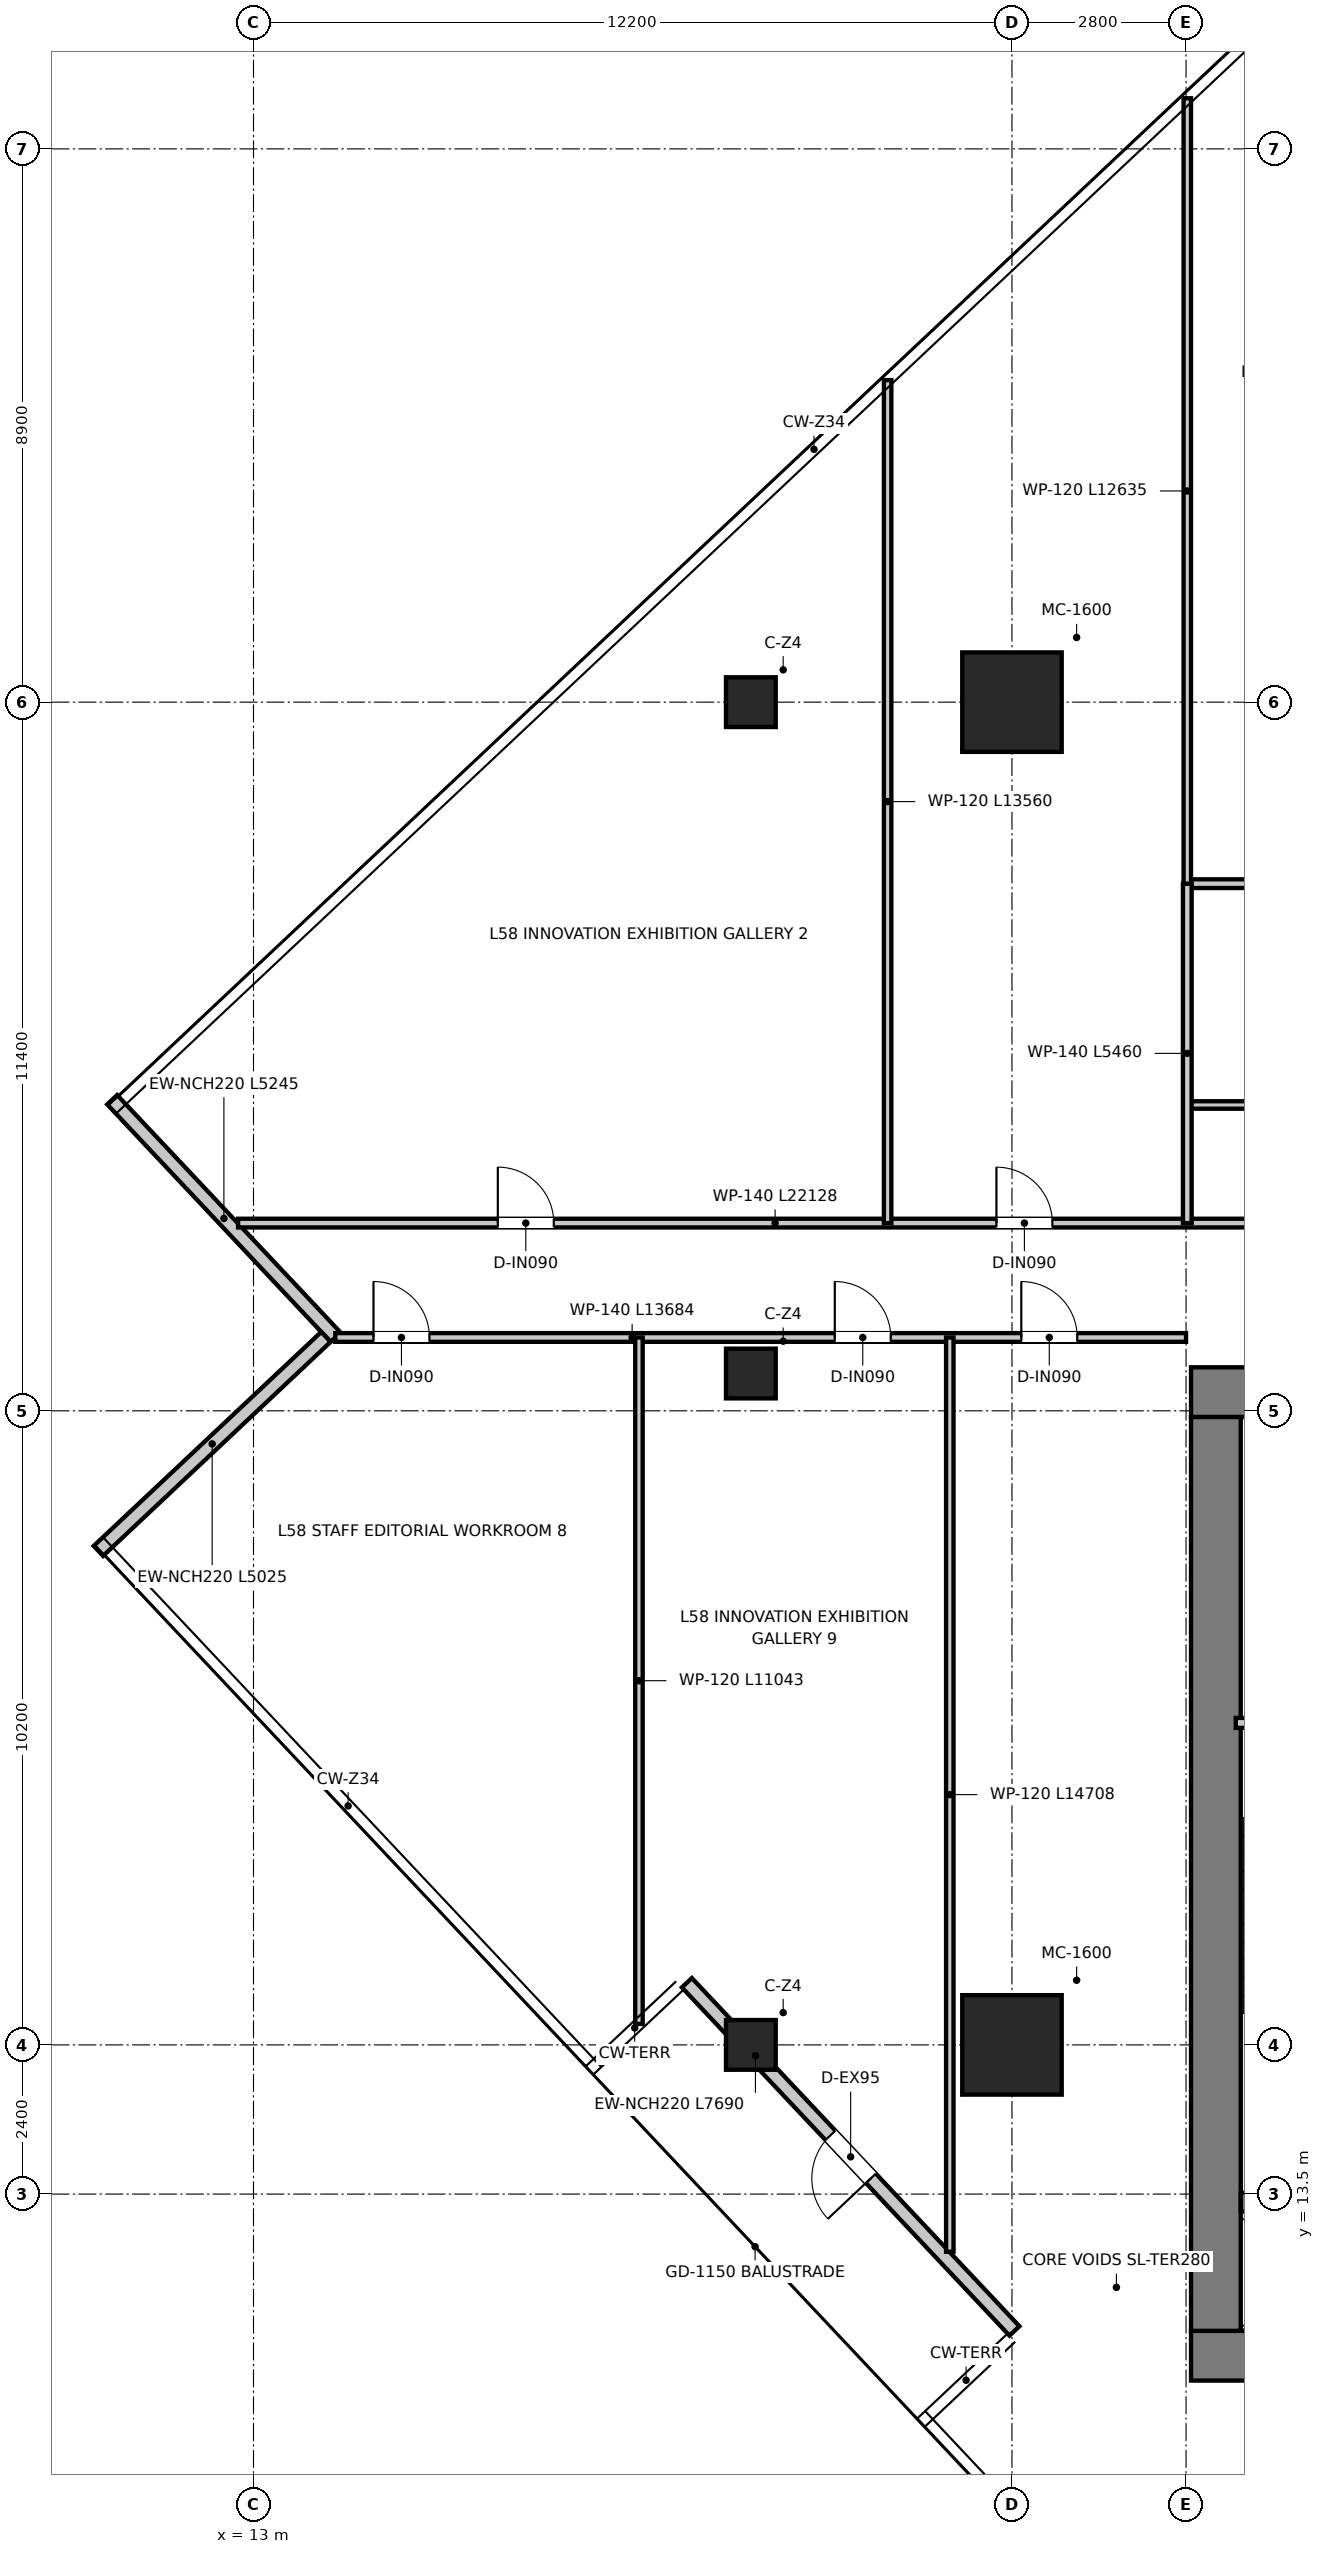
"""IFC4 building model, lengths in metres.
Left out: names, types, materials, properties, quantities, classifications, styles, units other than length and angle.
Written with IfcOpenShell. Run it as: python <this file> out.ifc"""

import sys

from ifc_helpers import new_model, si_unit, direction, frame, frame_2d, origin, origin_2d, place, context, subcontext, project, spatial, rectangle, extrude, source, transform, mapped, element, fill, save


model = new_model("IFC4")
c1 = context("Model", 3, precision=1e-05, world=origin(), true_north=direction((0.0, 1.0)))
c2 = subcontext(c1, "Body", "Model", "MODEL_VIEW")
j1 = project(units=[si_unit("LENGTHUNIT", "METRE"), si_unit("PLANEANGLEUNIT", "RADIAN")], contexts=[c1])
p1 = place(None, origin())
s1 = spatial("IfcSite", under=j1, at=p1, CompositionType="ELEMENT")
p2 = place(p1, origin())
s2 = spatial("IfcBuilding", under=s1, at=p2, CompositionType="ELEMENT")
p3 = place(p2, frame((0.0, 0.0, 238.9)))
s3 = spatial("IfcBuildingStorey", under=s2, at=p3, CompositionType="ELEMENT", Elevation=238.9)
p4 = place(p3, frame((28.08, 10.9, 0.0), z_axis=(0.0, 0.0, 1.0), x_axis=(1.0, 0.0, 0.0)))
e1 = element("IfcWall", 1, at=p4, inside=s3, PredefinedType="SHEAR", context=c2, shape_type="SweptSolid", body=[
    extrude(rectangle(XDim=15.84, YDim=0.8, at=frame_2d((7.92, 0.0))), origin(), (0.0, 0.0, 1.0), 3.95),
])
p5 = place(p3, frame((28.08, 26.4, 0.0), z_axis=(0.0, 0.0, 1.0), x_axis=(1.0, 0.0, 0.0)))
e2 = element("IfcWall", 2, at=p5, inside=s3, PredefinedType="SHEAR", context=c2, shape_type="SweptSolid", body=[
    extrude(rectangle(XDim=15.84, YDim=0.8, at=frame_2d((7.92, 0.0))), origin(), (0.0, 0.0, 1.0), 3.95),
])
p6 = place(p5, frame((7.22, 0.0, 0.0)))
e3 = element("IfcOpeningElement", 3, at=p6, cuts=e2, PredefinedType="OPENING", context=c2, shape_type="SweptSolid", body=[
    extrude(rectangle(XDim=1.4, YDim=2.2, at=frame_2d((0.7, 1.1))), frame((0.0, 0.41, 0.0), z_axis=(0.0, -1.0, 0.0), x_axis=(1.0, 0.0, 0.0)), (0.0, 0.0, 1.0), 0.82),
])
p7 = place(p5, frame((1.775, 0.0, 0.0)))
e4 = element("IfcOpeningElement", 4, at=p7, cuts=e2, PredefinedType="OPENING", context=c2, shape_type="SweptSolid", body=[
    extrude(rectangle(XDim=1.05, YDim=2.1, at=frame_2d((0.525, 1.05))), frame((0.0, 0.41, 0.0), z_axis=(0.0, -1.0, 0.0), x_axis=(1.0, 0.0, 0.0)), (0.0, 0.0, 1.0), 0.82),
])
p8 = place(p5, frame((13.015, 0.0, 0.0)))
e5 = element("IfcOpeningElement", 5, at=p8, cuts=e2, PredefinedType="OPENING", context=c2, shape_type="SweptSolid", body=[
    extrude(rectangle(XDim=1.05, YDim=2.1, at=frame_2d((0.525, 1.05))), frame((0.0, 0.41, 0.0), z_axis=(0.0, -1.0, 0.0), x_axis=(1.0, 0.0, 0.0)), (0.0, 0.0, 1.0), 0.82),
])
p9 = place(p3, frame((28.48, 11.3, 0.0), z_axis=(0.0, 0.0, 1.0), x_axis=(0.0, 1.0, 0.0)))
e6 = element("IfcWall", 6, at=p9, inside=s3, PredefinedType="SHEAR", context=c2, shape_type="SweptSolid", body=[
    extrude(rectangle(XDim=14.7, YDim=0.8, at=frame_2d((7.35, 0.0))), origin(), (0.0, 0.0, 1.0), 3.95),
])
p10 = place(p3, frame((28.88, 13.37, 0.0), z_axis=(0.0, 0.0, 1.0), x_axis=(1.0, 0.0, 0.0)))
e7 = element("IfcWall", 7, at=p10, inside=s3, PredefinedType="SHEAR", context=c2, shape_type="SweptSolid", body=[
    extrude(rectangle(XDim=3.1, YDim=0.3, at=frame_2d((1.55, 0.0))), origin(), (0.0, 0.0, 1.0), 3.95),
])
m1 = source(origin(), c2, "Body", "SweptSolid", [
    extrude(rectangle(XDim=1.6, YDim=1.6, at=origin_2d()), origin(), (0.0, 0.0, 1.0), 3.95),
])
for number, where, z_axis, x_axis in (
    (8, (25.2, 15.9, 0.0), (0.0, 0.0, 1.0), (1.0, 0.0, 0.0)),
    (9, (25.2, 37.5, 0.0), (0.0, 0.0, 1.0), (1.0, 0.0, 0.0)),
):
    element("IfcColumn", number, at=place(p3, frame(where, z_axis=z_axis, x_axis=x_axis)), inside=s3, PredefinedType="USERDEFINED", context=c2, shape_type="MappedRepresentation", body=[
        mapped(m1, transform((0.0, 0.0, 0.0), x_axis=(1.0, 0.0, 0.0), y_axis=(0.0, 1.0, 0.0), z_axis=(0.0, 0.0, 1.0), scale=1.0)),
    ])
m2 = source(origin(), c2, "Body", "SweptSolid", [
    extrude(rectangle(XDim=0.8, YDim=0.8, at=origin_2d()), origin(), (0.0, 0.0, 1.0), 3.95),
])
for number, where, z_axis, x_axis in (
    (10, (21.0, 15.9, 0.0), (0.0, 0.0, 1.0), (1.0, 0.0, 0.0)),
    (11, (21.0, 26.7, 0.0), (0.0, 0.0, 1.0), (1.0, 0.0, 0.0)),
    (12, (21.0, 37.5, 0.0), (0.0, 0.0, 1.0), (1.0, 0.0, 0.0)),
):
    element("IfcColumn", number, at=place(p3, frame(where, z_axis=z_axis, x_axis=x_axis)), inside=s3, PredefinedType="COLUMN", context=c2, shape_type="MappedRepresentation", body=[
        mapped(m2, transform((0.0, 0.0, 0.0), x_axis=(1.0, 0.0, 0.0), y_axis=(0.0, 1.0, 0.0), z_axis=(0.0, 0.0, 1.0), scale=1.0)),
    ])
p11 = place(p3, frame((10.727, 31.105, 0.0), z_axis=(0.0, 0.0, 1.0), x_axis=(0.685178828418, -0.728374884992, 0.0)))
e13 = element("IfcWall", 13, at=p11, inside=s3, PredefinedType="ELEMENTEDWALL", context=c2, shape_type="SweptSolid", body=[
    extrude(rectangle(XDim=5.245, YDim=0.22, at=frame_2d((2.623, 0.0))), origin(), (0.0, 0.0, 1.0), 3.67),
])
p12 = place(p3, frame((14.165, 27.289, 0.0), z_axis=(0.0, 0.0, 1.0), x_axis=(-0.728372554527, -0.685181305796, 0.0)))
e14 = element("IfcWall", 14, at=p12, inside=s3, PredefinedType="ELEMENTEDWALL", context=c2, shape_type="SweptSolid", body=[
    extrude(rectangle(XDim=5.025, YDim=0.22, at=frame_2d((2.513, 0.0))), origin(), (0.0, 0.0, 1.0), 3.67),
])
p13 = place(p3, frame((25.24, 11.299, 0.0), z_axis=(0.0, 0.0, 1.0), x_axis=(-0.685172559646, 0.728380781946, 0.0)))
e15 = element("IfcWall", 15, at=p13, inside=s3, PredefinedType="ELEMENTEDWALL", context=c2, shape_type="SweptSolid", body=[
    extrude(rectangle(XDim=7.69, YDim=0.22, at=frame_2d((3.845, 0.0))), origin(), (0.0, 0.0, 1.0), 3.18),
])
p14 = place(p13, frame((3.37, 0.0, 0.0)))
e16 = element("IfcOpeningElement", 16, at=p14, cuts=e15, PredefinedType="OPENING", context=c2, shape_type="SweptSolid", body=[
    extrude(rectangle(XDim=0.95, YDim=2.1, at=frame_2d((0.475, 1.05))), frame((0.0, 0.12, 0.0), z_axis=(0.0, -1.0, 0.0), x_axis=(1.0, 0.0, 0.0)), (0.0, 0.0, 1.0), 0.24),
])
p15 = place(p3, frame((28.8, 21.08, 0.0), z_axis=(0.0, 0.0, 1.0), x_axis=(1.0, 0.0, 0.0)))
e17 = element("IfcWall", 17, at=p15, inside=s3, PredefinedType="PARTITIONING", context=c2, shape_type="SweptSolid", body=[
    extrude(rectangle(XDim=3.16, YDim=0.16, at=frame_2d((1.58, 0.0))), origin(), (0.0, 0.0, 1.0), 3.67),
])
p16 = place(p15, frame((1.055, 0.0, 0.0)))
e18 = element("IfcOpeningElement", 18, at=p16, cuts=e17, PredefinedType="OPENING", context=c2, shape_type="SweptSolid", body=[
    extrude(rectangle(XDim=1.05, YDim=2.1, at=frame_2d((0.525, 1.05))), frame((0.0, 0.09, 0.0), z_axis=(0.0, -1.0, 0.0), x_axis=(1.0, 0.0, 0.0)), (0.0, 0.0, 1.0), 0.18),
])
p17 = place(p3, frame((12.752, 29.12, 0.0), z_axis=(0.0, 0.0, 1.0), x_axis=(1.0, 0.0, 0.0)))
e19 = element("IfcWall", 19, at=p17, inside=s3, PredefinedType="PARTITIONING", context=c2, shape_type="SweptSolid", body=[
    extrude(rectangle(XDim=22.128, YDim=0.14, at=frame_2d((11.064, 0.0))), origin(), (0.0, 0.0, 1.0), 3.03),
])
p18 = place(p17, frame((18.198, 0.0, 0.0)))
e20 = element("IfcOpeningElement", 20, at=p18, cuts=e19, PredefinedType="OPENING", context=c2, shape_type="SweptSolid", body=[
    extrude(rectangle(XDim=0.9, YDim=2.1, at=frame_2d((0.45, 1.05))), frame((0.0, 0.08, 0.0), z_axis=(0.0, -1.0, 0.0), x_axis=(1.0, 0.0, 0.0)), (0.0, 0.0, 1.0), 0.16),
])
p19 = place(p17, frame((4.178, 0.0, 0.0)))
e21 = element("IfcOpeningElement", 21, at=p19, cuts=e19, PredefinedType="OPENING", context=c2, shape_type="SweptSolid", body=[
    extrude(rectangle(XDim=0.9, YDim=2.1, at=frame_2d((0.45, 1.05))), frame((0.0, 0.08, 0.0), z_axis=(0.0, -1.0, 0.0), x_axis=(1.0, 0.0, 0.0)), (0.0, 0.0, 1.0), 0.16),
])
p20 = place(p17, frame((12.198, 0.0, 0.0)))
e22 = element("IfcOpeningElement", 22, at=p20, cuts=e19, PredefinedType="OPENING", context=c2, shape_type="SweptSolid", body=[
    extrude(rectangle(XDim=0.9, YDim=2.1, at=frame_2d((0.45, 1.05))), frame((0.0, 0.08, 0.0), z_axis=(0.0, -1.0, 0.0), x_axis=(1.0, 0.0, 0.0)), (0.0, 0.0, 1.0), 0.16),
])
p21 = place(p3, frame((14.316, 27.28, 0.0), z_axis=(0.0, 0.0, 1.0), x_axis=(1.0, 0.0, 0.0)))
e23 = element("IfcWall", 23, at=p21, inside=s3, PredefinedType="PARTITIONING", context=c2, shape_type="SweptSolid", body=[
    extrude(rectangle(XDim=13.684, YDim=0.14, at=frame_2d((6.842, 0.0))), origin(), (0.0, 0.0, 1.0), 3.03),
])
p22 = place(p21, frame((0.614, 0.0, 0.0)))
e24 = element("IfcOpeningElement", 24, at=p22, cuts=e23, PredefinedType="OPENING", context=c2, shape_type="SweptSolid", body=[
    extrude(rectangle(XDim=0.9, YDim=2.1, at=frame_2d((0.45, 1.05))), frame((0.0, 0.08, 0.0), z_axis=(0.0, -1.0, 0.0), x_axis=(1.0, 0.0, 0.0)), (0.0, 0.0, 1.0), 0.16),
])
p23 = place(p21, frame((8.034, 0.0, 0.0)))
e25 = element("IfcOpeningElement", 25, at=p23, cuts=e23, PredefinedType="OPENING", context=c2, shape_type="SweptSolid", body=[
    extrude(rectangle(XDim=0.9, YDim=2.1, at=frame_2d((0.45, 1.05))), frame((0.0, 0.08, 0.0), z_axis=(0.0, -1.0, 0.0), x_axis=(1.0, 0.0, 0.0)), (0.0, 0.0, 1.0), 0.16),
])
p24 = place(p21, frame((11.034, 0.0, 0.0)))
e26 = element("IfcOpeningElement", 26, at=p24, cuts=e23, PredefinedType="OPENING", context=c2, shape_type="SweptSolid", body=[
    extrude(rectangle(XDim=0.9, YDim=2.1, at=frame_2d((0.45, 1.05))), frame((0.0, 0.08, 0.0), z_axis=(0.0, -1.0, 0.0), x_axis=(1.0, 0.0, 0.0)), (0.0, 0.0, 1.0), 0.16),
])
p25 = place(p3, frame((28.02, 31.02, 0.0), z_axis=(0.0, 0.0, 1.0), x_axis=(1.0, 0.0, 0.0)))
e27 = element("IfcWall", 27, at=p25, inside=s3, PredefinedType="PARTITIONING", context=c2, shape_type="SweptSolid", body=[
    extrude(rectangle(XDim=6.86, YDim=0.12, at=frame_2d((3.43, 0.0))), origin(), (0.0, 0.0, 1.0), 3.18),
])
p26 = place(p3, frame((28.02, 34.58, 0.0), z_axis=(0.0, 0.0, 1.0), x_axis=(1.0, 0.0, 0.0)))
e28 = element("IfcWall", 28, at=p26, inside=s3, PredefinedType="PARTITIONING", context=c2, shape_type="SweptSolid", body=[
    extrude(rectangle(XDim=6.86, YDim=0.14, at=frame_2d((3.43, 0.0))), origin(), (0.0, 0.0, 1.0), 3.18),
])
p27 = place(p3, frame((28.02, 29.12, 0.0), z_axis=(0.0, 0.0, 1.0), x_axis=(0.0, 1.0, 0.0)))
e29 = element("IfcWall", 29, at=p27, inside=s3, PredefinedType="PARTITIONING", context=c2, shape_type="SweptSolid", body=[
    extrude(rectangle(XDim=5.46, YDim=0.14, at=frame_2d((2.73, 0.0))), origin(), (0.0, 0.0, 1.0), 3.37),
])
p28 = place(p3, frame((23.2, 29.12, 0.0), z_axis=(0.0, 0.0, 1.0), x_axis=(0.0, 1.0, 0.0)))
e30 = element("IfcWall", 30, at=p28, inside=s3, PredefinedType="PARTITIONING", context=c2, shape_type="SweptSolid", body=[
    extrude(rectangle(XDim=13.56, YDim=0.12, at=frame_2d((6.78, 0.0))), origin(), (0.0, 0.0, 1.0), 3.18),
])
p29 = place(p3, frame((28.02, 34.58, 0.0), z_axis=(0.0, 0.0, 1.0), x_axis=(0.0, 1.0, 0.0)))
e31 = element("IfcWall", 31, at=p29, inside=s3, PredefinedType="PARTITIONING", context=c2, shape_type="SweptSolid", body=[
    extrude(rectangle(XDim=12.635, YDim=0.12, at=frame_2d((6.317, 0.0))), origin(), (0.0, 0.0, 1.0), 3.03),
])
p30 = place(p3, frame((19.2, 16.237, 0.0), z_axis=(0.0, 0.0, 1.0), x_axis=(0.0, 1.0, 0.0)))
e32 = element("IfcWall", 32, at=p30, inside=s3, PredefinedType="PARTITIONING", context=c2, shape_type="SweptSolid", body=[
    extrude(rectangle(XDim=11.043, YDim=0.12, at=frame_2d((5.521, 0.0))), origin(), (0.0, 0.0, 1.0), 3.67),
])
p31 = place(p3, frame((24.2, 12.572, 0.0), z_axis=(0.0, 0.0, 1.0), x_axis=(0.0, 1.0, 0.0)))
e33 = element("IfcWall", 33, at=p31, inside=s3, PredefinedType="PARTITIONING", context=c2, shape_type="SweptSolid", body=[
    extrude(rectangle(XDim=14.708, YDim=0.12, at=frame_2d((7.354, 0.0))), origin(), (0.0, 0.0, 1.0), 3.18),
])
p32 = place(p19, origin())
e34 = element("IfcDoor", 34, at=p32, inside=s3, OperationType="SINGLE_SWING_LEFT", PredefinedType="DOOR", context=c2, shape_type="SweptSolid", body=[
    extrude(rectangle(XDim=0.9, YDim=2.1, at=frame_2d((0.45, 1.05))), frame((0.0, 0.025, 0.0), z_axis=(0.0, -1.0, 0.0), x_axis=(1.0, 0.0, 0.0)), (0.0, 0.0, 1.0), 0.05),
])
fill(e21, e34)
p33 = place(p20, origin())
e35 = element("IfcDoor", 35, at=p33, inside=s3, OperationType="SINGLE_SWING_LEFT", PredefinedType="DOOR", context=c2, shape_type="SweptSolid", body=[
    extrude(rectangle(XDim=0.9, YDim=2.1, at=frame_2d((0.45, 1.05))), frame((0.0, 0.025, 0.0), z_axis=(0.0, -1.0, 0.0), x_axis=(1.0, 0.0, 0.0)), (0.0, 0.0, 1.0), 0.05),
])
fill(e22, e35)
p34 = place(p22, origin())
e36 = element("IfcDoor", 36, at=p34, inside=s3, OperationType="SINGLE_SWING_LEFT", PredefinedType="DOOR", context=c2, shape_type="SweptSolid", body=[
    extrude(rectangle(XDim=0.9, YDim=2.1, at=frame_2d((0.45, 1.05))), frame((0.0, 0.025, 0.0), z_axis=(0.0, -1.0, 0.0), x_axis=(1.0, 0.0, 0.0)), (0.0, 0.0, 1.0), 0.05),
])
fill(e24, e36)
p35 = place(p23, origin())
e37 = element("IfcDoor", 37, at=p35, inside=s3, OperationType="SINGLE_SWING_LEFT", PredefinedType="DOOR", context=c2, shape_type="SweptSolid", body=[
    extrude(rectangle(XDim=0.9, YDim=2.1, at=frame_2d((0.45, 1.05))), frame((0.0, 0.025, 0.0), z_axis=(0.0, -1.0, 0.0), x_axis=(1.0, 0.0, 0.0)), (0.0, 0.0, 1.0), 0.05),
])
fill(e25, e37)
p36 = place(p24, origin())
e38 = element("IfcDoor", 38, at=p36, inside=s3, OperationType="SINGLE_SWING_LEFT", PredefinedType="DOOR", context=c2, shape_type="SweptSolid", body=[
    extrude(rectangle(XDim=0.9, YDim=2.1, at=frame_2d((0.45, 1.05))), frame((0.0, 0.025, 0.0), z_axis=(0.0, -1.0, 0.0), x_axis=(1.0, 0.0, 0.0)), (0.0, 0.0, 1.0), 0.05),
])
fill(e26, e38)
p37 = place(p14, origin())
e39 = element("IfcDoor", 39, at=p37, inside=s3, OperationType="SINGLE_SWING_LEFT", PredefinedType="DOOR", context=c2, shape_type="SweptSolid", body=[
    extrude(rectangle(XDim=0.95, YDim=2.1, at=frame_2d((0.475, 1.05))), frame((0.0, 0.025, 0.0), z_axis=(0.0, -1.0, 0.0), x_axis=(1.0, 0.0, 0.0)), (0.0, 0.0, 1.0), 0.05),
])
fill(e16, e39)
save(model, sys.argv[1])
